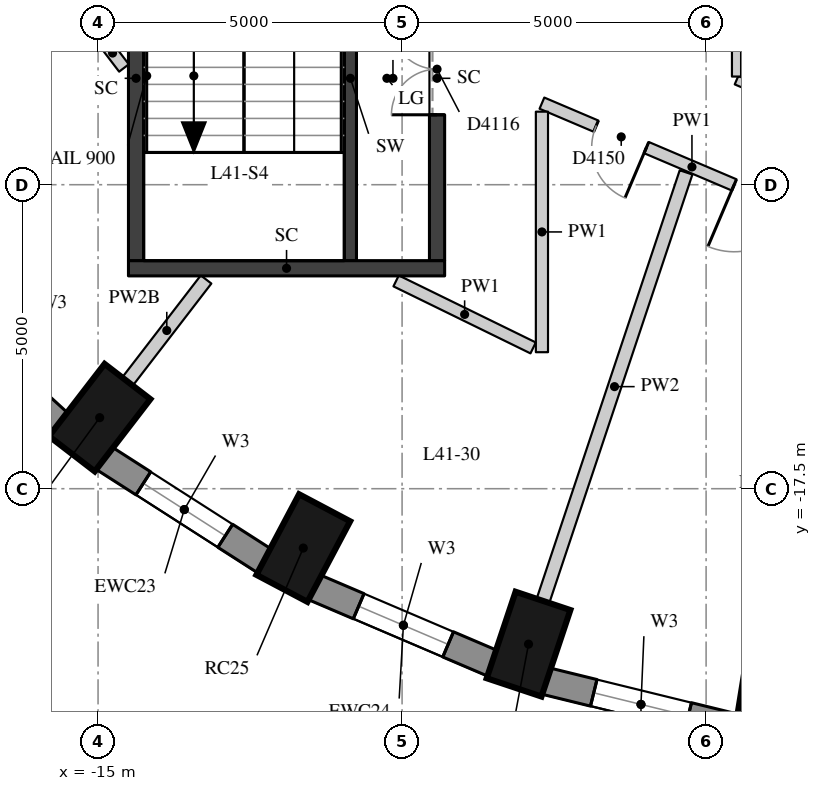
"""IFC4 building model, lengths in metres.
Left out: names, types, materials, properties, quantities, classifications, styles, units other than length and angle.
Written with IfcOpenShell. Run it as: python <this file> out.ifc"""

import sys

from ifc_helpers import new_model, si_unit, direction, frame, frame_2d, origin, origin_2d, place, context, subcontext, project, spatial, rectangle, extrude, element, fill, save


model = new_model("IFC4")
c1 = context("Model", 3, precision=1e-05, world=origin(), true_north=direction((0.0, 1.0)))
c2 = subcontext(c1, "Body", "Model", "MODEL_VIEW")
j1 = project(units=[si_unit("LENGTHUNIT", "METRE"), si_unit("PLANEANGLEUNIT", "RADIAN")], contexts=[c1])
p1 = place(None, origin())
s1 = spatial("IfcSite", under=j1, at=p1, CompositionType="ELEMENT")
p2 = place(p1, origin())
s2 = spatial("IfcBuilding", under=s1, at=p2, CompositionType="ELEMENT")
p3 = place(p2, frame((0.0, 0.0, 148.4)))
s3 = spatial("IfcBuildingStorey", under=s2, at=p3, CompositionType="ELEMENT", Elevation=148.4)
for number, where, z_axis, x_axis in (
    (1, (-14.973, -16.332, 0.0), (0.0, 0.0, 1.0), (-0.61, -0.792, 0.0)),
    (2, (-11.625, -18.476, 0.0), (0.0, 0.0, 1.0), (-0.468, -0.884, 0.0)),
    (3, (-7.92, -20.056, 0.0), (0.0, 0.0, 1.0), (-0.317, -0.949, 0.0)),
    (4, (-3.972, -21.024, 0.0), (0.0, 0.0, 1.0), (-0.16, -0.987, 0.0)),
):
    element("IfcColumn", number, at=place(p3, frame(where, z_axis=z_axis, x_axis=x_axis)), inside=s3, PredefinedType="COLUMN", context=c2, shape_type="SweptSolid", body=[
        extrude(rectangle(XDim=1.5, YDim=0.95, at=origin_2d()), origin(), (0.0, 0.0, 1.0), 3.3),
    ])
p4 = place(p3, frame((-17.913, -14.35, 0.0), z_axis=(0.0, 0.0, 1.0), x_axis=(0.737808755941, -0.675009807082, 0.0)))
e5 = element("IfcWall", 5, at=p4, inside=s3, PredefinedType="SOLIDWALL", context=c2, shape_type="SweptSolid", body=[
    extrude(rectangle(XDim=3.094, YDim=0.45, at=frame_2d((1.547, 0.0))), origin(), (0.0, 0.0, 1.0), 3.02),
])
p5 = place(p4, frame((0.747, 0.0, 0.4)))
e6 = element("IfcOpeningElement", 6, at=p5, cuts=e5, PredefinedType="OPENING", context=c2, shape_type="SweptSolid", body=[
    extrude(rectangle(XDim=1.6, YDim=1.75, at=frame_2d((0.8, 0.875))), frame((0.0, 0.235, 0.0), z_axis=(0.0, -1.0, 0.0), x_axis=(1.0, 0.0, 0.0)), (0.0, 0.0, 1.0), 0.47),
])
p6 = place(p3, frame((-14.908, -16.993, 0.0), z_axis=(0.0, 0.0, 1.0), x_axis=(0.842065914439, -0.539374633943, 0.0)))
e7 = element("IfcWall", 7, at=p6, inside=s3, PredefinedType="SOLIDWALL", context=c2, shape_type="SweptSolid", body=[
    extrude(rectangle(XDim=3.151, YDim=0.45, at=frame_2d((1.576, 0.0))), origin(), (0.0, 0.0, 1.0), 3.02),
])
p7 = place(p6, frame((0.776, 0.0, 0.4)))
e8 = element("IfcOpeningElement", 8, at=p7, cuts=e7, PredefinedType="OPENING", context=c2, shape_type="SweptSolid", body=[
    extrude(rectangle(XDim=1.6, YDim=1.75, at=frame_2d((0.8, 0.875))), frame((0.0, 0.235, 0.0), z_axis=(0.0, -1.0, 0.0), x_axis=(1.0, 0.0, 0.0)), (0.0, 0.0, 1.0), 0.47),
])
p8 = place(p3, frame((-11.45, -19.119, 0.0), z_axis=(0.0, 0.0, 1.0), x_axis=(0.919798725687, -0.392390499663, 0.0)))
e9 = element("IfcWall", 9, at=p8, inside=s3, PredefinedType="SOLIDWALL", context=c2, shape_type="SweptSolid", body=[
    extrude(rectangle(XDim=3.2, YDim=0.45, at=frame_2d((1.6, 0.0))), origin(), (0.0, 0.0, 1.0), 3.02),
])
p9 = place(p8, frame((0.8, 0.0, 0.4)))
e10 = element("IfcOpeningElement", 10, at=p9, cuts=e9, PredefinedType="OPENING", context=c2, shape_type="SweptSolid", body=[
    extrude(rectangle(XDim=1.6, YDim=1.75, at=frame_2d((0.8, 0.875))), frame((0.0, 0.235, 0.0), z_axis=(0.0, -1.0, 0.0), x_axis=(1.0, 0.0, 0.0)), (0.0, 0.0, 1.0), 0.47),
])
p10 = place(p3, frame((-7.643, -20.662, 0.0), z_axis=(0.0, 0.0, 1.0), x_axis=(0.971232901476, -0.238131583563, 0.0)))
e11 = element("IfcWall", 11, at=p10, inside=s3, PredefinedType="SOLIDWALL", context=c2, shape_type="SweptSolid", body=[
    extrude(rectangle(XDim=3.237, YDim=0.45, at=frame_2d((1.618, 0.0))), origin(), (0.0, 0.0, 1.0), 3.02),
])
p11 = place(p10, frame((0.818, 0.0, 0.4)))
e12 = element("IfcOpeningElement", 12, at=p11, cuts=e11, PredefinedType="OPENING", context=c2, shape_type="SweptSolid", body=[
    extrude(rectangle(XDim=1.6, YDim=1.75, at=frame_2d((0.8, 0.875))), frame((0.0, 0.235, 0.0), z_axis=(0.0, -1.0, 0.0), x_axis=(1.0, 0.0, 0.0)), (0.0, 0.0, 1.0), 0.47),
])
p12 = place(p3, frame((-10.85, -13.75, 0.0), z_axis=(0.0, 0.0, 1.0), x_axis=(0.0, 1.0, 0.0)))
e13 = element("IfcWall", 13, at=p12, inside=s3, PredefinedType="SHEAR", context=c2, shape_type="SweptSolid", body=[
    extrude(rectangle(XDim=6.0, YDim=0.2, at=frame_2d((3.0, 0.0))), origin(), (0.0, 0.0, 1.0), 3.02),
])
p13 = place(p12, frame((4.4, 0.0, 0.0)))
e14 = element("IfcOpeningElement", 14, at=p13, cuts=e13, PredefinedType="OPENING", context=c2, shape_type="SweptSolid", body=[
    extrude(rectangle(XDim=1.5, YDim=2.1, at=frame_2d((0.75, 1.05))), frame((0.0, 0.11, 0.0), z_axis=(0.0, -1.0, 0.0), x_axis=(1.0, 0.0, 0.0)), (0.0, 0.0, 1.0), 0.22),
])
p14 = place(p3, frame((-14.375, -13.75, -0.28), z_axis=(0.0, 0.0, 1.0), x_axis=(0.0, 1.0, 0.0)))
e15 = element("IfcWall", 15, at=p14, inside=s3, PredefinedType="SHEAR", context=c2, shape_type="SweptSolid", body=[
    extrude(rectangle(XDim=6.0, YDim=0.25, at=frame_2d((3.0, 0.0))), origin(), (0.0, 0.0, 1.0), 3.3),
])
p15 = place(p3, frame((-9.425, -13.75, -0.28), z_axis=(0.0, 0.0, 1.0), x_axis=(0.0, 1.0, 0.0)))
e16 = element("IfcWall", 16, at=p15, inside=s3, PredefinedType="SHEAR", context=c2, shape_type="SweptSolid", body=[
    extrude(rectangle(XDim=6.0, YDim=0.25, at=frame_2d((3.0, 0.0))), origin(), (0.0, 0.0, 1.0), 3.3),
])
p16 = place(p15, frame((2.4, 0.0, 0.28)))
e17 = element("IfcOpeningElement", 17, at=p16, cuts=e16, PredefinedType="OPENING", context=c2, shape_type="SweptSolid", body=[
    extrude(rectangle(XDim=1.5, YDim=2.1, at=frame_2d((0.75, 1.05))), frame((0.0, 0.135, 0.0), z_axis=(0.0, -1.0, 0.0), x_axis=(1.0, 0.0, 0.0)), (0.0, 0.0, 1.0), 0.27),
])
p17 = place(p3, frame((-14.5, -13.875, -0.28), z_axis=(0.0, 0.0, 1.0), x_axis=(1.0, 0.0, 0.0)))
e18 = element("IfcWall", 18, at=p17, inside=s3, PredefinedType="SHEAR", context=c2, shape_type="SweptSolid", body=[
    extrude(rectangle(XDim=5.2, YDim=0.25, at=frame_2d((2.6, 0.0))), origin(), (0.0, 0.0, 1.0), 3.3),
])
p18 = place(p3, frame((-2.766, -13.258, 0.0), z_axis=(0.0, 0.0, 1.0), x_axis=(-0.920210819037, 0.391423106787, 0.0)))
e19 = element("IfcWall", 19, at=p18, inside=s3, PredefinedType="PARTITIONING", context=c2, shape_type="SweptSolid", body=[
    extrude(rectangle(XDim=5.362, YDim=0.2, at=frame_2d((2.681, 0.0))), origin(), (0.0, 0.0, 1.0), 3.02),
])
p19 = place(p18, frame((3.495, 0.0, 0.0)))
e20 = element("IfcOpeningElement", 20, at=p19, cuts=e19, PredefinedType="OPENING", context=c2, shape_type="SweptSolid", body=[
    extrude(rectangle(XDim=0.9, YDim=2.1, at=frame_2d((0.45, 1.05))), frame((0.0, 0.11, 0.0), z_axis=(0.0, -1.0, 0.0), x_axis=(1.0, 0.0, 0.0)), (0.0, 0.0, 1.0), 0.22),
])
p20 = place(p18, frame((0.827, 0.0, 0.0)))
e21 = element("IfcOpeningElement", 21, at=p20, cuts=e19, PredefinedType="OPENING", context=c2, shape_type="SweptSolid", body=[
    extrude(rectangle(XDim=1.1, YDim=2.1, at=frame_2d((0.55, 1.05))), frame((0.0, 0.11, 0.0), z_axis=(0.0, -1.0, 0.0), x_axis=(1.0, 0.0, 0.0)), (0.0, 0.0, 1.0), 0.22),
])
p21 = place(p3, frame((-7.7, -11.299, 0.0), z_axis=(0.0, 0.0, 1.0), x_axis=(0.0, -1.0, 0.0)))
e22 = element("IfcWall", 22, at=p21, inside=s3, PredefinedType="PARTITIONING", context=c2, shape_type="SweptSolid", body=[
    extrude(rectangle(XDim=3.956, YDim=0.2, at=frame_2d((1.978, 0.0))), origin(), (0.0, 0.0, 1.0), 3.02),
])
p22 = place(p3, frame((-7.844, -15.185, 0.0), z_axis=(0.0, 0.0, 1.0), x_axis=(-0.898266579534, 0.439450966653, 0.0)))
e23 = element("IfcWall", 23, at=p22, inside=s3, PredefinedType="PARTITIONING", context=c2, shape_type="SweptSolid", body=[
    extrude(rectangle(XDim=2.509, YDim=0.2, at=frame_2d((1.254, 0.0))), origin(), (0.0, 0.0, 1.0), 3.02),
])
p23 = place(p3, frame((-14.574, -10.58, 0.0), z_axis=(0.0, 0.0, 1.0), x_axis=(-0.606745625174, 0.794896060081, 0.0)))
e24 = element("IfcWall", 24, at=p23, inside=s3, PredefinedType="PARTITIONING", context=c2, shape_type="SweptSolid", body=[
    extrude(rectangle(XDim=0.618, YDim=0.2, at=frame_2d((0.309, 0.0))), origin(), (0.0, 0.0, 1.0), 3.02),
])
p24 = place(p3, frame((-2.501, -11.631, 0.0), z_axis=(0.0, 0.0, 1.0), x_axis=(-0.920228720371, 0.391381019217, 0.0)))
e25 = element("IfcWall", 25, at=p24, inside=s3, PredefinedType="PARTITIONING", context=c2, shape_type="SweptSolid", body=[
    extrude(rectangle(XDim=2.172, YDim=0.15, at=frame_2d((1.086, 0.0))), origin(), (0.0, 0.0, 1.0), 3.02),
])
p25 = place(p3, frame((-4.5, -10.721, 0.0), z_axis=(0.0, 0.0, 1.0), x_axis=(0.0, 1.0, 0.0)))
e26 = element("IfcWall", 26, at=p25, inside=s3, PredefinedType="PARTITIONING", context=c2, shape_type="SweptSolid", body=[
    extrude(rectangle(XDim=2.859, YDim=0.15, at=frame_2d((1.43, 0.0))), origin(), (0.0, 0.0, 1.0), 3.02),
])
p26 = place(p3, frame((-14.516, -15.737, 0.0), z_axis=(0.0, 0.0, 1.0), x_axis=(0.609983624648, 0.792414019097, 0.0)))
e27 = element("IfcWall", 27, at=p26, inside=s3, PredefinedType="PARTITIONING", context=c2, shape_type="SweptSolid", body=[
    extrude(rectangle(XDim=2.118, YDim=0.22, at=frame_2d((1.059, 0.0))), origin(), (0.0, 0.0, 1.0), 2.57),
])
p27 = place(p3, frame((-7.683, -19.345, 0.0), z_axis=(0.0, 0.0, 1.0), x_axis=(0.316720596973, 0.948518878807, 0.0)))
e28 = element("IfcWall", 28, at=p27, inside=s3, PredefinedType="PARTITIONING", context=c2, shape_type="SweptSolid", body=[
    extrude(rectangle(XDim=7.43, YDim=0.22, at=frame_2d((3.715, 0.0))), origin(), (0.0, 0.0, 1.0), 3.02),
])
p28 = place(p7, origin())
e29 = element("IfcWindow", 29, at=p28, inside=s3, PartitioningType="SINGLE_PANEL", PredefinedType="WINDOW", context=c2, shape_type="SweptSolid", body=[
    extrude(rectangle(XDim=1.6, YDim=1.75, at=frame_2d((0.8, 0.875))), frame((0.0, 0.035, 0.0), z_axis=(0.0, -1.0, 0.0), x_axis=(1.0, 0.0, 0.0)), (0.0, 0.0, 1.0), 0.06),
])
fill(e8, e29)
p29 = place(p9, origin())
e30 = element("IfcWindow", 30, at=p29, inside=s3, PartitioningType="SINGLE_PANEL", PredefinedType="WINDOW", context=c2, shape_type="SweptSolid", body=[
    extrude(rectangle(XDim=1.6, YDim=1.75, at=frame_2d((0.8, 0.875))), frame((0.0, 0.035, 0.0), z_axis=(0.0, -1.0, 0.0), x_axis=(1.0, 0.0, 0.0)), (0.0, 0.0, 1.0), 0.06),
])
fill(e10, e30)
p30 = place(p11, origin())
e31 = element("IfcWindow", 31, at=p30, inside=s3, PartitioningType="SINGLE_PANEL", PredefinedType="WINDOW", context=c2, shape_type="SweptSolid", body=[
    extrude(rectangle(XDim=1.6, YDim=1.75, at=frame_2d((0.8, 0.875))), frame((0.0, 0.035, 0.0), z_axis=(0.0, -1.0, 0.0), x_axis=(1.0, 0.0, 0.0)), (0.0, 0.0, 1.0), 0.06),
])
fill(e12, e31)
p31 = place(p16, origin())
e32 = element("IfcDoor", 32, at=p31, inside=s3, OperationType="DOUBLE_DOOR_SINGLE_SWING", PredefinedType="DOOR", context=c2, shape_type="SweptSolid", body=[
    extrude(rectangle(XDim=1.5, YDim=2.1, at=frame_2d((0.75, 1.05))), frame((0.0, 0.025, 0.0), z_axis=(0.0, -1.0, 0.0), x_axis=(1.0, 0.0, 0.0)), (0.0, 0.0, 1.0), 0.05),
])
fill(e17, e32)
p32 = place(p19, origin())
e33 = element("IfcDoor", 33, at=p32, inside=s3, OperationType="SINGLE_SWING_LEFT", PredefinedType="DOOR", context=c2, shape_type="SweptSolid", body=[
    extrude(rectangle(XDim=0.9, YDim=2.1, at=frame_2d((0.45, 1.05))), frame((0.0, 0.025, 0.0), z_axis=(0.0, -1.0, 0.0), x_axis=(1.0, 0.0, 0.0)), (0.0, 0.0, 1.0), 0.05),
])
fill(e20, e33)
p33 = place(p20, origin())
e34 = element("IfcDoor", 34, at=p33, inside=s3, OperationType="SINGLE_SWING_RIGHT", PredefinedType="DOOR", context=c2, shape_type="SweptSolid", body=[
    extrude(rectangle(XDim=1.1, YDim=2.1, at=frame_2d((0.55, 1.05))), frame((0.0, 0.025, 0.0), z_axis=(0.0, -1.0, 0.0), x_axis=(1.0, 0.0, 0.0)), (0.0, 0.0, 1.0), 0.05),
])
fill(e21, e34)
save(model, sys.argv[1])
